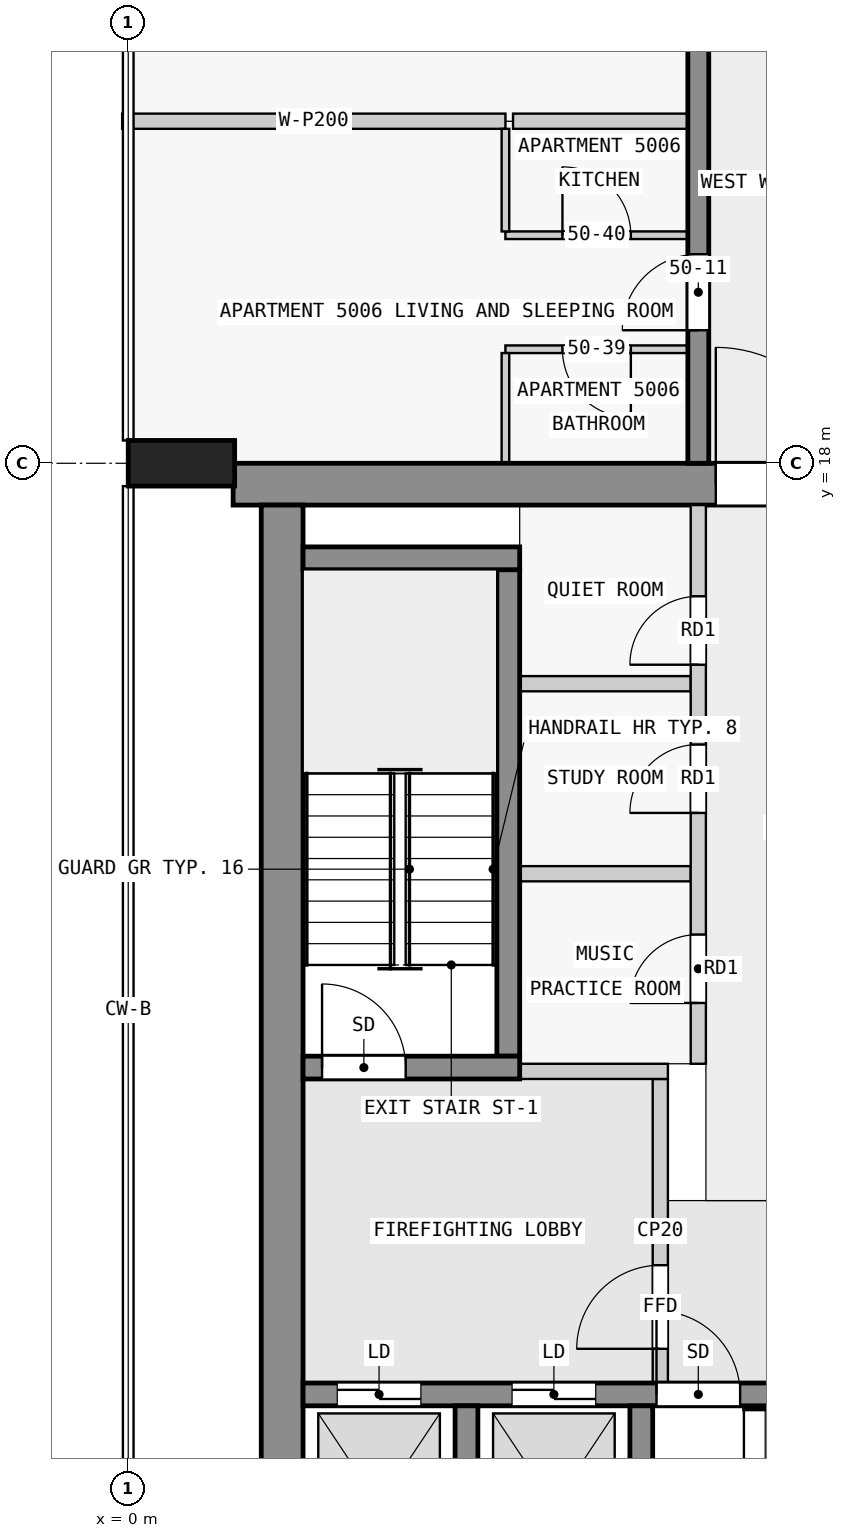
"""IFC4 building model, lengths in metres.
Left out: names, types, materials, properties, quantities, classifications, styles, units other than length and angle.
Written with IfcOpenShell. Run it as: python <this file> out.ifc"""

import sys

from ifc_helpers import new_model, si_unit, direction, frame, frame_2d, origin, origin_2d, place, context, subcontext, project, spatial, rectangle, extrude, element, fill, save


model = new_model("IFC4")
c1 = context("Model", 3, precision=1e-05, world=origin(), true_north=direction((0.0, 1.0)))
c2 = subcontext(c1, "Body", "Model", "MODEL_VIEW")
j1 = project(units=[si_unit("LENGTHUNIT", "METRE"), si_unit("PLANEANGLEUNIT", "RADIAN")], contexts=[c1])
p1 = place(None, origin())
s1 = spatial("IfcSite", under=j1, at=p1, CompositionType="ELEMENT")
p2 = place(p1, origin())
s2 = spatial("IfcBuilding", under=s1, at=p2, CompositionType="ELEMENT")
p3 = place(p2, frame((0.0, 0.0, 194.4)))
s3 = spatial("IfcBuildingStorey", under=s2, at=p3, CompositionType="ELEMENT", Elevation=194.4)
p4 = place(p3, frame((0.7, 18.0, 0.0), z_axis=(0.0, 0.0, 1.0), x_axis=(0.0, 1.0, 0.0)))
e1 = element("IfcColumn", 1, at=p4, inside=s3, PredefinedType="COLUMN", context=c2, shape_type="SweptSolid", body=[
    extrude(rectangle(XDim=0.6, YDim=1.4, at=origin_2d()), origin(), (0.0, 0.0, 1.0), 3.5),
])
p5 = place(p3, frame((1.38, 17.725, 0.0), z_axis=(0.0, 0.0, 1.0), x_axis=(1.0, 0.0, 0.0)))
e2 = element("IfcWall", 2, at=p5, inside=s3, PredefinedType="SHEAR", context=c2, shape_type="SweptSolid", body=[
    extrude(rectangle(XDim=21.12, YDim=0.55, at=frame_2d((10.56, 0.0))), origin(), (0.0, 0.0, 1.0), 3.25),
])
p6 = place(p5, frame((6.35, 0.0, 0.0)))
e3 = element("IfcOpeningElement", 3, at=p6, cuts=e2, PredefinedType="OPENING", context=c2, shape_type="SweptSolid", body=[
    extrude(rectangle(XDim=1.8, YDim=2.1, at=frame_2d((0.9, 1.05))), frame((0.0, 0.285, 0.0), z_axis=(0.0, -1.0, 0.0), x_axis=(1.0, 0.0, 0.0)), (0.0, 0.0, 1.0), 0.57),
])
p7 = place(p3, frame((2.025, 2.5, 0.0), z_axis=(0.0, 0.0, 1.0), x_axis=(0.0, 1.0, 0.0)))
e4 = element("IfcWall", 4, at=p7, inside=s3, PredefinedType="SHEAR", context=c2, shape_type="SweptSolid", body=[
    extrude(rectangle(XDim=14.95, YDim=0.55, at=frame_2d((7.475, 0.0))), origin(), (0.0, 0.0, 1.0), 3.25),
])
for number, where, z_axis, x_axis in (
    (5, (4.45, 2.8, 0.0), (0.0, 0.0, 1.0), (0.0, 1.0, 0.0)),
    (6, (6.75, 2.8, 0.0), (0.0, 0.0, 1.0), (0.0, 1.0, 0.0)),
):
    element("IfcWall", number, at=place(p3, frame(where, z_axis=z_axis, x_axis=x_axis)), inside=s3, PredefinedType="SHEAR", context=c2, shape_type="SweptSolid", body=[
        extrude(rectangle(XDim=2.8, YDim=0.3, at=frame_2d((1.4, 0.0))), origin(), (0.0, 0.0, 1.0), 3.25),
    ])
p8 = place(p3, frame((2.3, 5.75, 0.0), z_axis=(0.0, 0.0, 1.0), x_axis=(1.0, 0.0, 0.0)))
e7 = element("IfcWall", 7, at=p8, inside=s3, PredefinedType="SHEAR", context=c2, shape_type="SweptSolid", body=[
    extrude(rectangle(XDim=18.8, YDim=0.3, at=frame_2d((9.4, 0.0))), origin(), (0.0, 0.0, 1.0), 3.25),
])
p9 = place(p8, frame((4.65, 0.0, 0.0)))
e8 = element("IfcOpeningElement", 8, at=p9, cuts=e7, PredefinedType="OPENING", context=c2, shape_type="SweptSolid", body=[
    extrude(rectangle(XDim=1.1, YDim=2.1, at=frame_2d((0.55, 1.05))), frame((0.0, 0.16, 0.0), z_axis=(0.0, -1.0, 0.0), x_axis=(1.0, 0.0, 0.0)), (0.0, 0.0, 1.0), 0.32),
])
p10 = place(p8, frame((0.45, 0.0, 0.0)))
e9 = element("IfcOpeningElement", 9, at=p10, cuts=e7, PredefinedType="OPENING", context=c2, shape_type="SweptSolid", body=[
    extrude(rectangle(XDim=1.1, YDim=2.1, at=frame_2d((0.55, 1.05))), frame((0.0, 0.16, 0.0), z_axis=(0.0, -1.0, 0.0), x_axis=(1.0, 0.0, 0.0)), (0.0, 0.0, 1.0), 0.32),
])
p11 = place(p8, frame((2.75, 0.0, 0.0)))
e10 = element("IfcOpeningElement", 10, at=p11, cuts=e7, PredefinedType="OPENING", context=c2, shape_type="SweptSolid", body=[
    extrude(rectangle(XDim=1.1, YDim=2.1, at=frame_2d((0.55, 1.05))), frame((0.0, 0.16, 0.0), z_axis=(0.0, -1.0, 0.0), x_axis=(1.0, 0.0, 0.0)), (0.0, 0.0, 1.0), 0.32),
])
p12 = place(p8, frame((11.95, 0.0, 0.0)))
e11 = element("IfcOpeningElement", 11, at=p12, cuts=e7, PredefinedType="OPENING", context=c2, shape_type="SweptSolid", body=[
    extrude(rectangle(XDim=0.9, YDim=2.1, at=frame_2d((0.45, 1.05))), frame((0.0, 0.16, 0.0), z_axis=(0.0, -1.0, 0.0), x_axis=(1.0, 0.0, 0.0)), (0.0, 0.0, 1.0), 0.32),
])
p13 = place(p8, frame((15.7, 0.0, 0.0)))
e12 = element("IfcOpeningElement", 12, at=p13, cuts=e7, PredefinedType="OPENING", context=c2, shape_type="SweptSolid", body=[
    extrude(rectangle(XDim=0.9, YDim=2.1, at=frame_2d((0.45, 1.05))), frame((0.0, 0.16, 0.0), z_axis=(0.0, -1.0, 0.0), x_axis=(1.0, 0.0, 0.0)), (0.0, 0.0, 1.0), 0.32),
])
p14 = place(p3, frame((2.3, 10.05, 0.0), z_axis=(0.0, 0.0, 1.0), x_axis=(1.0, 0.0, 0.0)))
e13 = element("IfcWall", 13, at=p14, inside=s3, PredefinedType="SHEAR", context=c2, shape_type="SweptSolid", body=[
    extrude(rectangle(XDim=2.85, YDim=0.3, at=frame_2d((1.425, 0.0))), origin(), (0.0, 0.0, 1.0), 3.25),
])
p15 = place(p14, frame((0.25, 0.0, 0.0)))
e14 = element("IfcOpeningElement", 14, at=p15, cuts=e13, PredefinedType="OPENING", context=c2, shape_type="SweptSolid", body=[
    extrude(rectangle(XDim=1.1, YDim=2.1, at=frame_2d((0.55, 1.05))), frame((0.0, 0.16, 0.0), z_axis=(0.0, -1.0, 0.0), x_axis=(1.0, 0.0, 0.0)), (0.0, 0.0, 1.0), 0.32),
])
p16 = place(p3, frame((5.0, 10.2, 0.0), z_axis=(0.0, 0.0, 1.0), x_axis=(0.0, 1.0, 0.0)))
e15 = element("IfcWall", 15, at=p16, inside=s3, PredefinedType="SHEAR", context=c2, shape_type="SweptSolid", body=[
    extrude(rectangle(XDim=6.4, YDim=0.3, at=frame_2d((3.2, 0.0))), origin(), (0.0, 0.0, 1.0), 3.25),
])
p17 = place(p3, frame((2.3, 16.75, 0.0), z_axis=(0.0, 0.0, 1.0), x_axis=(1.0, 0.0, 0.0)))
e16 = element("IfcWall", 16, at=p17, inside=s3, PredefinedType="SHEAR", context=c2, shape_type="SweptSolid", body=[
    extrude(rectangle(XDim=2.85, YDim=0.3, at=frame_2d((1.425, 0.0))), origin(), (0.0, 0.0, 1.0), 3.25),
])
p18 = place(p3, frame((7.5, 18.0, 0.0), z_axis=(0.0, 0.0, 1.0), x_axis=(0.0, 1.0, 0.0)))
e17 = element("IfcWall", 17, at=p18, inside=s3, PredefinedType="SHEAR", context=c2, shape_type="SweptSolid", body=[
    extrude(rectangle(XDim=27.0, YDim=0.275, at=frame_2d((13.5, 0.0))), origin(), (0.0, 0.0, 1.0), 3.25),
])
p19 = place(p18, frame((1.75, 0.0, 0.0)))
e18 = element("IfcOpeningElement", 18, at=p19, cuts=e17, PredefinedType="OPENING", context=c2, shape_type="SweptSolid", body=[
    extrude(rectangle(XDim=1.0, YDim=2.1, at=frame_2d((0.5, 1.05))), frame((0.0, 0.147, 0.0), z_axis=(0.0, -1.0, 0.0), x_axis=(1.0, 0.0, 0.0)), (0.0, 0.0, 1.0), 0.295),
])
p20 = place(p18, frame((5.85, 0.0, 0.0)))
e19 = element("IfcOpeningElement", 19, at=p20, cuts=e17, PredefinedType="OPENING", context=c2, shape_type="SweptSolid", body=[
    extrude(rectangle(XDim=1.8, YDim=2.1, at=frame_2d((0.9, 1.05))), frame((0.0, 0.147, 0.0), z_axis=(0.0, -1.0, 0.0), x_axis=(1.0, 0.0, 0.0)), (0.0, 0.0, 1.0), 0.295),
])
p21 = place(p18, frame((10.75, 0.0, 0.0)))
e20 = element("IfcOpeningElement", 20, at=p21, cuts=e17, PredefinedType="OPENING", context=c2, shape_type="SweptSolid", body=[
    extrude(rectangle(XDim=1.0, YDim=2.1, at=frame_2d((0.5, 1.05))), frame((0.0, 0.147, 0.0), z_axis=(0.0, -1.0, 0.0), x_axis=(1.0, 0.0, 0.0)), (0.0, 0.0, 1.0), 0.295),
])
p22 = place(p18, frame((15.25, 0.0, 0.0)))
e21 = element("IfcOpeningElement", 21, at=p22, cuts=e17, PredefinedType="OPENING", context=c2, shape_type="SweptSolid", body=[
    extrude(rectangle(XDim=1.0, YDim=2.1, at=frame_2d((0.5, 1.05))), frame((0.0, 0.147, 0.0), z_axis=(0.0, -1.0, 0.0), x_axis=(1.0, 0.0, 0.0)), (0.0, 0.0, 1.0), 0.295),
])
p23 = place(p18, frame((21.35, 0.0, 0.0)))
e22 = element("IfcOpeningElement", 22, at=p23, cuts=e17, PredefinedType="OPENING", context=c2, shape_type="SweptSolid", body=[
    extrude(rectangle(XDim=1.0, YDim=2.1, at=frame_2d((0.5, 1.05))), frame((0.0, 0.147, 0.0), z_axis=(0.0, -1.0, 0.0), x_axis=(1.0, 0.0, 0.0)), (0.0, 0.0, 1.0), 0.295),
])
p24 = place(p3, frame((7.0, 5.9, 0.0), z_axis=(0.0, 0.0, 1.0), x_axis=(0.0, 1.0, 0.0)))
e23 = element("IfcWall", 23, at=p24, inside=s3, PredefinedType="PARTITIONING", context=c2, shape_type="SweptSolid", body=[
    extrude(rectangle(XDim=4.0, YDim=0.2, at=frame_2d((2.0, 0.0))), origin(), (0.0, 0.0, 1.0), 3.25),
])
p25 = place(p24, frame((0.45, 0.0, 0.0)))
e24 = element("IfcOpeningElement", 24, at=p25, cuts=e23, PredefinedType="OPENING", context=c2, shape_type="SweptSolid", body=[
    extrude(rectangle(XDim=1.1, YDim=2.1, at=frame_2d((0.55, 1.05))), frame((0.0, 0.11, 0.0), z_axis=(0.0, -1.0, 0.0), x_axis=(1.0, 0.0, 0.0)), (0.0, 0.0, 1.0), 0.22),
])
p26 = place(p3, frame((5.15, 10.0, 0.0), z_axis=(0.0, 0.0, 1.0), x_axis=(1.0, 0.0, 0.0)))
e25 = element("IfcWall", 25, at=p26, inside=s3, PredefinedType="PARTITIONING", context=c2, shape_type="SweptSolid", body=[
    extrude(rectangle(XDim=1.95, YDim=0.2, at=frame_2d((0.975, 0.0))), origin(), (0.0, 0.0, 1.0), 3.25),
])
p27 = place(p3, frame((7.5, 10.1, 0.0), z_axis=(0.0, 0.0, 1.0), x_axis=(0.0, 1.0, 0.0)))
e26 = element("IfcWall", 26, at=p27, inside=s3, PredefinedType="PARTITIONING", context=c2, shape_type="SweptSolid", body=[
    extrude(rectangle(XDim=7.35, YDim=0.2, at=frame_2d((3.675, 0.0))), origin(), (0.0, 0.0, 1.0), 3.25),
])
p28 = place(p27, frame((0.8, 0.0, 0.0)))
e27 = element("IfcOpeningElement", 27, at=p28, cuts=e26, PredefinedType="OPENING", context=c2, shape_type="SweptSolid", body=[
    extrude(rectangle(XDim=0.9, YDim=2.1, at=frame_2d((0.45, 1.05))), frame((0.0, 0.11, 0.0), z_axis=(0.0, -1.0, 0.0), x_axis=(1.0, 0.0, 0.0)), (0.0, 0.0, 1.0), 0.22),
])
p29 = place(p27, frame((3.3, 0.0, 0.0)))
e28 = element("IfcOpeningElement", 28, at=p29, cuts=e26, PredefinedType="OPENING", context=c2, shape_type="SweptSolid", body=[
    extrude(rectangle(XDim=0.9, YDim=2.1, at=frame_2d((0.45, 1.05))), frame((0.0, 0.11, 0.0), z_axis=(0.0, -1.0, 0.0), x_axis=(1.0, 0.0, 0.0)), (0.0, 0.0, 1.0), 0.22),
])
p30 = place(p27, frame((5.25, 0.0, 0.0)))
e29 = element("IfcOpeningElement", 29, at=p30, cuts=e26, PredefinedType="OPENING", context=c2, shape_type="SweptSolid", body=[
    extrude(rectangle(XDim=0.9, YDim=2.1, at=frame_2d((0.45, 1.05))), frame((0.0, 0.11, 0.0), z_axis=(0.0, -1.0, 0.0), x_axis=(1.0, 0.0, 0.0)), (0.0, 0.0, 1.0), 0.22),
])
for number, where, z_axis, x_axis in (
    (30, (5.15, 12.6, 0.0), (0.0, 0.0, 1.0), (1.0, 0.0, 0.0)),
    (31, (5.15, 15.1, 0.0), (0.0, 0.0, 1.0), (1.0, 0.0, 0.0)),
):
    element("IfcWall", number, at=place(p3, frame(where, z_axis=z_axis, x_axis=x_axis)), inside=s3, PredefinedType="PARTITIONING", context=c2, shape_type="SweptSolid", body=[
        extrude(rectangle(XDim=2.25, YDim=0.2, at=frame_2d((1.125, 0.0))), origin(), (0.0, 0.0, 1.0), 3.25),
    ])
p31 = place(p3, frame((7.363, 19.5, 0.0), z_axis=(0.0, 0.0, 1.0), x_axis=(-1.0, 0.0, 0.0)))
e32 = element("IfcWall", 32, at=p31, inside=s3, PredefinedType="PARTITIONING", context=c2, shape_type="SweptSolid", body=[
    extrude(rectangle(XDim=2.4, YDim=0.1, at=frame_2d((1.2, 0.0))), origin(), (0.0, 0.0, 1.0), 3.25),
])
p32 = place(p31, frame((0.75, 0.0, 0.0)))
e33 = element("IfcOpeningElement", 33, at=p32, cuts=e32, PredefinedType="OPENING", context=c2, shape_type="SweptSolid", body=[
    extrude(rectangle(XDim=0.9, YDim=2.1, at=frame_2d((0.45, 1.05))), frame((0.0, 0.06, 0.0), z_axis=(0.0, -1.0, 0.0), x_axis=(1.0, 0.0, 0.0)), (0.0, 0.0, 1.0), 0.12),
])
p33 = place(p3, frame((4.962, 21.0, 0.0), z_axis=(0.0, 0.0, 1.0), x_axis=(1.0, 0.0, 0.0)))
e34 = element("IfcWall", 34, at=p33, inside=s3, PredefinedType="PARTITIONING", context=c2, shape_type="SweptSolid", body=[
    extrude(rectangle(XDim=2.4, YDim=0.1, at=frame_2d((1.2, 0.0))), origin(), (0.0, 0.0, 1.0), 3.25),
])
p34 = place(p33, frame((0.75, 0.0, 0.0)))
e35 = element("IfcOpeningElement", 35, at=p34, cuts=e34, PredefinedType="OPENING", context=c2, shape_type="SweptSolid", body=[
    extrude(rectangle(XDim=0.9, YDim=2.1, at=frame_2d((0.45, 1.05))), frame((0.0, 0.06, 0.0), z_axis=(0.0, -1.0, 0.0), x_axis=(1.0, 0.0, 0.0)), (0.0, 0.0, 1.0), 0.12),
])
p35 = place(p3, frame((7.363, 22.5, 0.0), z_axis=(0.0, 0.0, 1.0), x_axis=(-1.0, 0.0, 0.0)))
e36 = element("IfcWall", 36, at=p35, inside=s3, PredefinedType="PARTITIONING", context=c2, shape_type="SweptSolid", body=[
    extrude(rectangle(XDim=2.3, YDim=0.2, at=frame_2d((1.15, 0.0))), origin(), (0.0, 0.0, 1.0), 3.25),
])
p36 = place(p3, frame((-0.08, 22.5, 0.0), z_axis=(0.0, 0.0, 1.0), x_axis=(1.0, 0.0, 0.0)))
e37 = element("IfcWall", 37, at=p36, inside=s3, PredefinedType="PARTITIONING", context=c2, shape_type="SweptSolid", body=[
    extrude(rectangle(XDim=5.042, YDim=0.2, at=frame_2d((2.521, 0.0))), origin(), (0.0, 0.0, 1.0), 3.25),
])
p37 = place(p3, frame((4.962, 19.45, 0.0), z_axis=(0.0, 0.0, 1.0), x_axis=(0.0, -1.0, 0.0)))
e38 = element("IfcWall", 38, at=p37, inside=s3, PredefinedType="PARTITIONING", context=c2, shape_type="SweptSolid", body=[
    extrude(rectangle(XDim=1.45, YDim=0.1, at=frame_2d((0.725, 0.0))), origin(), (0.0, 0.0, 1.0), 3.25),
])
p38 = place(p3, frame((4.962, 22.4, 0.0), z_axis=(0.0, 0.0, 1.0), x_axis=(0.0, -1.0, 0.0)))
e39 = element("IfcWall", 39, at=p38, inside=s3, PredefinedType="PARTITIONING", context=c2, shape_type="SweptSolid", body=[
    extrude(rectangle(XDim=1.35, YDim=0.1, at=frame_2d((0.675, 0.0))), origin(), (0.0, 0.0, 1.0), 3.25),
])
p39 = place(p25, origin())
e40 = element("IfcDoor", 40, at=p39, inside=s3, OperationType="SINGLE_SWING_LEFT", PredefinedType="DOOR", context=c2, shape_type="SweptSolid", body=[
    extrude(rectangle(XDim=1.1, YDim=2.1, at=frame_2d((0.55, 1.05))), frame((0.0, 0.025, 0.0), z_axis=(0.0, -1.0, 0.0), x_axis=(1.0, 0.0, 0.0)), (0.0, 0.0, 1.0), 0.05),
])
fill(e24, e40)
p40 = place(p15, origin())
e41 = element("IfcDoor", 41, at=p40, inside=s3, OperationType="SINGLE_SWING_RIGHT", PredefinedType="DOOR", context=c2, shape_type="SweptSolid", body=[
    extrude(rectangle(XDim=1.1, YDim=2.1, at=frame_2d((0.55, 1.05))), frame((0.0, 0.025, 0.0), z_axis=(0.0, -1.0, 0.0), x_axis=(1.0, 0.0, 0.0)), (0.0, 0.0, 1.0), 0.05),
])
fill(e14, e41)
p41 = place(p9, origin())
e42 = element("IfcDoor", 42, at=p41, inside=s3, OperationType="SINGLE_SWING_LEFT", PredefinedType="DOOR", context=c2, shape_type="SweptSolid", body=[
    extrude(rectangle(XDim=1.1, YDim=2.1, at=frame_2d((0.55, 1.05))), frame((0.0, 0.025, 0.0), z_axis=(0.0, -1.0, 0.0), x_axis=(1.0, 0.0, 0.0)), (0.0, 0.0, 1.0), 0.05),
])
fill(e8, e42)
p42 = place(p10, origin())
e43 = element("IfcDoor", 43, at=p42, inside=s3, OperationType="DOUBLE_DOOR_SLIDING", PredefinedType="DOOR", context=c2, shape_type="SweptSolid", body=[
    extrude(rectangle(XDim=1.1, YDim=2.1, at=frame_2d((0.55, 1.05))), frame((0.0, 0.025, 0.0), z_axis=(0.0, -1.0, 0.0), x_axis=(1.0, 0.0, 0.0)), (0.0, 0.0, 1.0), 0.05),
])
fill(e9, e43)
p43 = place(p11, origin())
e44 = element("IfcDoor", 44, at=p43, inside=s3, OperationType="DOUBLE_DOOR_SLIDING", PredefinedType="DOOR", context=c2, shape_type="SweptSolid", body=[
    extrude(rectangle(XDim=1.1, YDim=2.1, at=frame_2d((0.55, 1.05))), frame((0.0, 0.025, 0.0), z_axis=(0.0, -1.0, 0.0), x_axis=(1.0, 0.0, 0.0)), (0.0, 0.0, 1.0), 0.05),
])
fill(e10, e44)
p44 = place(p6, origin())
e45 = element("IfcDoor", 45, at=p44, inside=s3, OperationType="DOUBLE_DOOR_SINGLE_SWING", PredefinedType="DOOR", context=c2, shape_type="SweptSolid", body=[
    extrude(rectangle(XDim=1.8, YDim=2.1, at=frame_2d((0.9, 1.05))), frame((0.0, 0.025, 0.0), z_axis=(0.0, -1.0, 0.0), x_axis=(1.0, 0.0, 0.0)), (0.0, 0.0, 1.0), 0.05),
])
fill(e3, e45)
p45 = place(p28, origin())
e46 = element("IfcDoor", 46, at=p45, inside=s3, OperationType="SINGLE_SWING_RIGHT", PredefinedType="DOOR", context=c2, shape_type="SweptSolid", body=[
    extrude(rectangle(XDim=0.9, YDim=2.1, at=frame_2d((0.45, 1.05))), frame((0.0, 0.025, 0.0), z_axis=(0.0, -1.0, 0.0), x_axis=(1.0, 0.0, 0.0)), (0.0, 0.0, 1.0), 0.05),
])
fill(e27, e46)
p46 = place(p29, origin())
e47 = element("IfcDoor", 47, at=p46, inside=s3, OperationType="SINGLE_SWING_RIGHT", PredefinedType="DOOR", context=c2, shape_type="SweptSolid", body=[
    extrude(rectangle(XDim=0.9, YDim=2.1, at=frame_2d((0.45, 1.05))), frame((0.0, 0.025, 0.0), z_axis=(0.0, -1.0, 0.0), x_axis=(1.0, 0.0, 0.0)), (0.0, 0.0, 1.0), 0.05),
])
fill(e28, e47)
p47 = place(p30, origin())
e48 = element("IfcDoor", 48, at=p47, inside=s3, OperationType="SINGLE_SWING_RIGHT", PredefinedType="DOOR", context=c2, shape_type="SweptSolid", body=[
    extrude(rectangle(XDim=0.9, YDim=2.1, at=frame_2d((0.45, 1.05))), frame((0.0, 0.025, 0.0), z_axis=(0.0, -1.0, 0.0), x_axis=(1.0, 0.0, 0.0)), (0.0, 0.0, 1.0), 0.05),
])
fill(e29, e48)
p48 = place(p19, origin())
e49 = element("IfcDoor", 49, at=p48, inside=s3, OperationType="SINGLE_SWING_LEFT", PredefinedType="DOOR", context=c2, shape_type="SweptSolid", body=[
    extrude(rectangle(XDim=1.0, YDim=2.1, at=frame_2d((0.5, 1.05))), frame((0.0, 0.025, 0.0), z_axis=(0.0, -1.0, 0.0), x_axis=(1.0, 0.0, 0.0)), (0.0, 0.0, 1.0), 0.05),
])
fill(e18, e49)
p49 = place(p32, origin())
e50 = element("IfcDoor", 50, at=p49, inside=s3, OperationType="SINGLE_SWING_RIGHT", PredefinedType="DOOR", context=c2, shape_type="SweptSolid", body=[
    extrude(rectangle(XDim=0.9, YDim=2.1, at=frame_2d((0.45, 1.05))), frame((0.0, 0.025, 0.0), z_axis=(0.0, -1.0, 0.0), x_axis=(1.0, 0.0, 0.0)), (0.0, 0.0, 1.0), 0.05),
])
fill(e33, e50)
p50 = place(p34, origin())
e51 = element("IfcDoor", 51, at=p50, inside=s3, OperationType="SINGLE_SWING_RIGHT", PredefinedType="DOOR", context=c2, shape_type="SweptSolid", body=[
    extrude(rectangle(XDim=0.9, YDim=2.1, at=frame_2d((0.45, 1.05))), frame((0.0, 0.025, 0.0), z_axis=(0.0, -1.0, 0.0), x_axis=(1.0, 0.0, 0.0)), (0.0, 0.0, 1.0), 0.05),
])
fill(e35, e51)
save(model, sys.argv[1])
